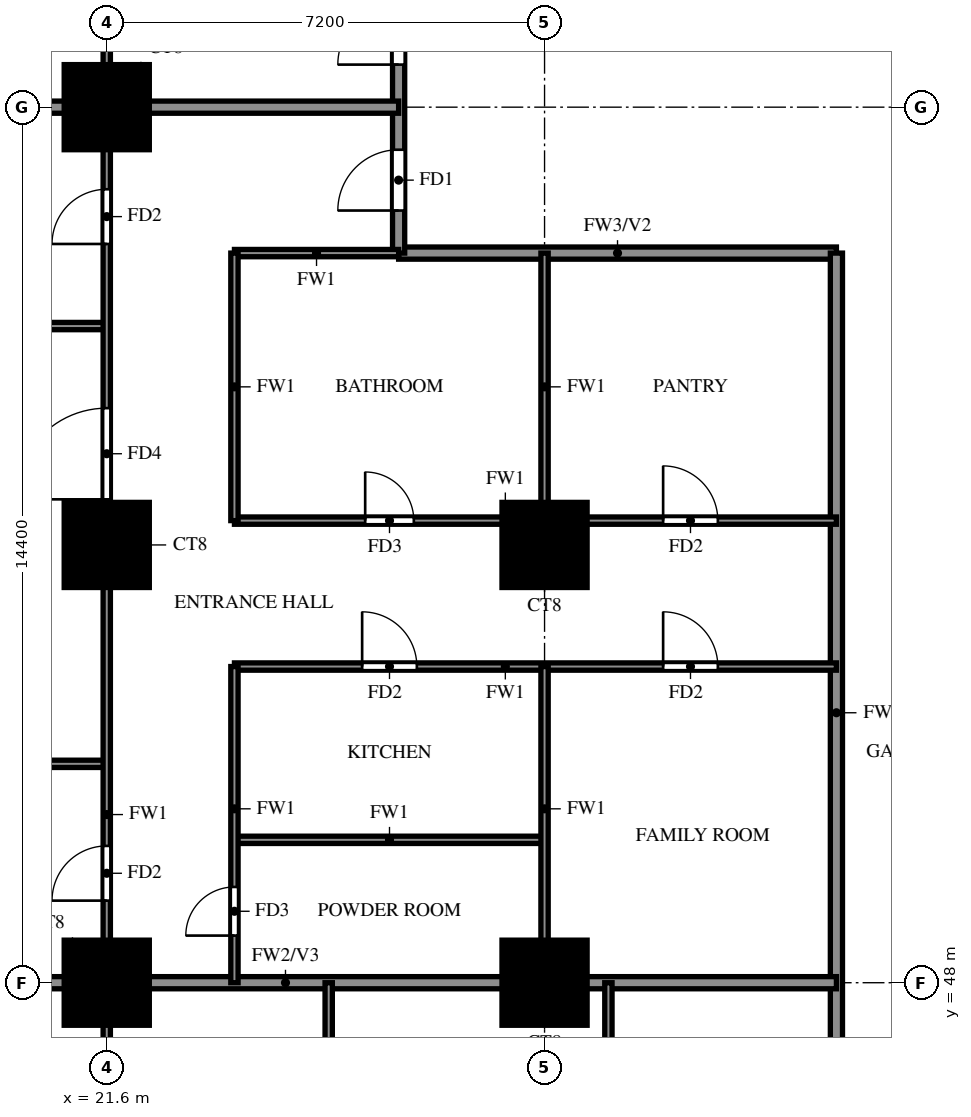
"""IFC4 building model, lengths in metres.
Left out: names, types, materials, properties, quantities, classifications, styles, units other than length and angle.
Written with IfcOpenShell. Run it as: python <this file> out.ifc"""

import sys

from ifc_helpers import new_model, si_unit, direction, frame, frame_2d, origin, origin_2d, place, context, subcontext, project, spatial, rectangle, extrude, source, transform, mapped, element, fill, save


model = new_model("IFC4")
c1 = context("Model", 3, precision=1e-05, world=origin(), true_north=direction((0.0, 1.0)))
c2 = subcontext(c1, "Body", "Model", "MODEL_VIEW")
j1 = project(units=[si_unit("LENGTHUNIT", "METRE"), si_unit("PLANEANGLEUNIT", "RADIAN")], contexts=[c1])
p1 = place(None, origin())
s1 = spatial("IfcSite", under=j1, at=p1, CompositionType="ELEMENT")
p2 = place(p1, origin())
s2 = spatial("IfcBuilding", under=s1, at=p2, CompositionType="ELEMENT")
p3 = place(p2, frame((0.0, 0.0, 34.0)))
s3 = spatial("IfcBuildingStorey", under=s2, at=p3, CompositionType="ELEMENT", Elevation=34.0)
m1 = source(origin(), c2, "Body", "SweptSolid", [
    extrude(rectangle(XDim=1.4, YDim=1.4, at=origin_2d()), origin(), (0.0, 0.0, 1.0), 3.18),
])
for number, where, z_axis, x_axis in (
    (1, (21.6, 48.0, 0.0), (0.0, 0.0, 1.0), (1.0, 0.0, 0.0)),
    (2, (28.8, 48.0, 0.0), (0.0, 0.0, 1.0), (1.0, 0.0, 0.0)),
    (3, (21.6, 55.2, 0.0), (0.0, 0.0, 1.0), (1.0, 0.0, 0.0)),
    (4, (28.8, 55.2, 0.0), (0.0, 0.0, 1.0), (1.0, 0.0, 0.0)),
    (5, (21.6, 62.4, 0.0), (0.0, 0.0, 1.0), (1.0, 0.0, 0.0)),
):
    element("IfcColumn", number, at=place(p3, frame(where, z_axis=z_axis, x_axis=x_axis)), inside=s3, PredefinedType="COLUMN", context=c2, shape_type="MappedRepresentation", body=[
        mapped(m1, transform((0.0, 0.0, 0.0))),
    ])
p4 = place(p3, frame((26.4, 60.0, 0.0), z_axis=(0.0, 0.0, 1.0), x_axis=(1.0, 0.0, 0.0)))
e6 = element("IfcWall", 6, at=p4, inside=s3, PredefinedType="SOLIDWALL", context=c2, shape_type="SweptSolid", body=[
    extrude(rectangle(XDim=7.2, YDim=0.2, at=frame_2d((3.6, 0.0))), origin(), (0.0, 0.0, 1.0), 3.18),
])
p5 = place(p3, frame((26.4, 60.0, 0.0), z_axis=(0.0, 0.0, 1.0), x_axis=(0.0, 1.0, 0.0)))
e7 = element("IfcWall", 7, at=p5, inside=s3, PredefinedType="SOLIDWALL", context=c2, shape_type="SweptSolid", body=[
    extrude(rectangle(XDim=9.6, YDim=0.2, at=frame_2d((4.8, 0.0))), origin(), (0.0, 0.0, 1.0), 3.18),
])
p6 = place(p5, frame((0.7, 0.0, 0.0)))
e8 = element("IfcOpeningElement", 8, at=p6, cuts=e7, PredefinedType="OPENING", context=c2, shape_type="SweptSolid", body=[
    extrude(rectangle(XDim=1.0, YDim=2.1, at=frame_2d((0.5, 1.05))), frame((0.0, 0.11, 0.0), z_axis=(0.0, -1.0, 0.0), x_axis=(1.0, 0.0, 0.0)), (0.0, 0.0, 1.0), 0.22),
])
p7 = place(p5, frame((3.1, 0.0, 0.0)))
e9 = element("IfcOpeningElement", 9, at=p7, cuts=e7, PredefinedType="OPENING", context=c2, shape_type="SweptSolid", body=[
    extrude(rectangle(XDim=1.0, YDim=2.1, at=frame_2d((0.5, 1.05))), frame((0.0, 0.11, 0.0), z_axis=(0.0, -1.0, 0.0), x_axis=(1.0, 0.0, 0.0)), (0.0, 0.0, 1.0), 0.22),
])
p8 = place(p3, frame((33.6, 45.6, 0.0), z_axis=(0.0, 0.0, 1.0), x_axis=(0.0, 1.0, 0.0)))
e10 = element("IfcWall", 10, at=p8, inside=s3, PredefinedType="SOLIDWALL", context=c2, shape_type="SweptSolid", body=[
    extrude(rectangle(XDim=14.4, YDim=0.2, at=frame_2d((7.2, 0.0))), origin(), (0.0, 0.0, 1.0), 3.18),
])
p9 = place(p3, frame((14.525, 48.0, 0.0), z_axis=(0.0, 0.0, 1.0), x_axis=(1.0, 0.0, 0.0)))
e11 = element("IfcWall", 11, at=p9, inside=s3, PredefinedType="SOLIDWALL", context=c2, shape_type="SweptSolid", body=[
    extrude(rectangle(XDim=19.075, YDim=0.2, at=frame_2d((9.538, 0.0))), origin(), (0.0, 0.0, 1.0), 3.18),
])
p10 = place(p3, frame((14.525, 62.4, 0.0), z_axis=(0.0, 0.0, 1.0), x_axis=(1.0, 0.0, 0.0)))
e12 = element("IfcWall", 12, at=p10, inside=s3, PredefinedType="SOLIDWALL", context=c2, shape_type="SweptSolid", body=[
    extrude(rectangle(XDim=11.875, YDim=0.2, at=frame_2d((5.938, 0.0))), origin(), (0.0, 0.0, 1.0), 3.18),
])
p11 = place(p3, frame((23.7, 50.35, 0.0), z_axis=(0.0, 0.0, 1.0), x_axis=(1.0, 0.0, 0.0)))
e13 = element("IfcWall", 13, at=p11, inside=s3, PredefinedType="PARTITIONING", context=c2, shape_type="SweptSolid", body=[
    extrude(rectangle(XDim=5.1, YDim=0.12, at=frame_2d((2.55, 0.0))), origin(), (0.0, 0.0, 1.0), 3.18),
])
p12 = place(p3, frame((14.525, 51.6, 0.0), z_axis=(0.0, 0.0, 1.0), x_axis=(1.0, 0.0, 0.0)))
e14 = element("IfcWall", 14, at=p12, inside=s3, PredefinedType="PARTITIONING", context=c2, shape_type="SweptSolid", body=[
    extrude(rectangle(XDim=7.075, YDim=0.12, at=frame_2d((3.538, 0.0))), origin(), (0.0, 0.0, 1.0), 2.28),
])
p13 = place(p3, frame((23.7, 53.2, 0.0), z_axis=(0.0, 0.0, 1.0), x_axis=(1.0, 0.0, 0.0)))
e15 = element("IfcWall", 15, at=p13, inside=s3, PredefinedType="PARTITIONING", context=c2, shape_type="SweptSolid", body=[
    extrude(rectangle(XDim=9.9, YDim=0.12, at=frame_2d((4.95, 0.0))), origin(), (0.0, 0.0, 1.0), 3.18),
])
p14 = place(p13, frame((2.1, 0.0, 0.0)))
e16 = element("IfcOpeningElement", 16, at=p14, cuts=e15, PredefinedType="OPENING", context=c2, shape_type="SweptSolid", body=[
    extrude(rectangle(XDim=0.9, YDim=2.1, at=frame_2d((0.45, 1.05))), frame((0.0, 0.07, 0.0), z_axis=(0.0, -1.0, 0.0), x_axis=(1.0, 0.0, 0.0)), (0.0, 0.0, 1.0), 0.14),
])
p15 = place(p13, frame((7.05, 0.0, 0.0)))
e17 = element("IfcOpeningElement", 17, at=p15, cuts=e15, PredefinedType="OPENING", context=c2, shape_type="SweptSolid", body=[
    extrude(rectangle(XDim=0.9, YDim=2.1, at=frame_2d((0.45, 1.05))), frame((0.0, 0.07, 0.0), z_axis=(0.0, -1.0, 0.0), x_axis=(1.0, 0.0, 0.0)), (0.0, 0.0, 1.0), 0.14),
])
p16 = place(p3, frame((23.7, 55.6, 0.0), z_axis=(0.0, 0.0, 1.0), x_axis=(1.0, 0.0, 0.0)))
e18 = element("IfcWall", 18, at=p16, inside=s3, PredefinedType="PARTITIONING", context=c2, shape_type="SweptSolid", body=[
    extrude(rectangle(XDim=9.9, YDim=0.12, at=frame_2d((4.95, 0.0))), origin(), (0.0, 0.0, 1.0), 3.18),
])
p17 = place(p16, frame((2.15, 0.0, 0.0)))
e19 = element("IfcOpeningElement", 19, at=p17, cuts=e18, PredefinedType="OPENING", context=c2, shape_type="SweptSolid", body=[
    extrude(rectangle(XDim=0.8, YDim=2.1, at=frame_2d((0.4, 1.05))), frame((0.0, 0.07, 0.0), z_axis=(0.0, -1.0, 0.0), x_axis=(1.0, 0.0, 0.0)), (0.0, 0.0, 1.0), 0.14),
])
p18 = place(p16, frame((7.05, 0.0, 0.0)))
e20 = element("IfcOpeningElement", 20, at=p18, cuts=e18, PredefinedType="OPENING", context=c2, shape_type="SweptSolid", body=[
    extrude(rectangle(XDim=0.9, YDim=2.1, at=frame_2d((0.45, 1.05))), frame((0.0, 0.07, 0.0), z_axis=(0.0, -1.0, 0.0), x_axis=(1.0, 0.0, 0.0)), (0.0, 0.0, 1.0), 0.14),
])
p19 = place(p3, frame((14.525, 58.8, 0.0), z_axis=(0.0, 0.0, 1.0), x_axis=(1.0, 0.0, 0.0)))
e21 = element("IfcWall", 21, at=p19, inside=s3, PredefinedType="PARTITIONING", context=c2, shape_type="SweptSolid", body=[
    extrude(rectangle(XDim=7.075, YDim=0.12, at=frame_2d((3.538, 0.0))), origin(), (0.0, 0.0, 1.0), 2.28),
])
p20 = place(p3, frame((23.7, 60.0, 0.0), z_axis=(0.0, 0.0, 1.0), x_axis=(1.0, 0.0, 0.0)))
e22 = element("IfcWall", 22, at=p20, inside=s3, PredefinedType="PARTITIONING", context=c2, shape_type="SweptSolid", body=[
    extrude(rectangle(XDim=2.7, YDim=0.12, at=frame_2d((1.35, 0.0))), origin(), (0.0, 0.0, 1.0), 3.18),
])
p21 = place(p3, frame((21.6, 33.725, 0.0), z_axis=(0.0, 0.0, 1.0), x_axis=(0.0, 1.0, 0.0)))
e23 = element("IfcWall", 23, at=p21, inside=s3, PredefinedType="PARTITIONING", context=c2, shape_type="SweptSolid", body=[
    extrude(rectangle(XDim=35.875, YDim=0.12, at=frame_2d((17.938, 0.0))), origin(), (0.0, 0.0, 1.0), 3.18),
])
p22 = place(p21, frame((7.775, 0.0, 0.0)))
e24 = element("IfcOpeningElement", 24, at=p22, cuts=e23, PredefinedType="OPENING", context=c2, shape_type="SweptSolid", body=[
    extrude(rectangle(XDim=0.9, YDim=2.1, at=frame_2d((0.45, 1.05))), frame((0.0, 0.07, 0.0), z_axis=(0.0, -1.0, 0.0), x_axis=(1.0, 0.0, 0.0)), (0.0, 0.0, 1.0), 0.14),
])
p23 = place(p21, frame((15.625, 0.0, 0.0)))
e25 = element("IfcOpeningElement", 25, at=p23, cuts=e23, PredefinedType="OPENING", context=c2, shape_type="SweptSolid", body=[
    extrude(rectangle(XDim=0.9, YDim=2.1, at=frame_2d((0.45, 1.05))), frame((0.0, 0.07, 0.0), z_axis=(0.0, -1.0, 0.0), x_axis=(1.0, 0.0, 0.0)), (0.0, 0.0, 1.0), 0.14),
])
p24 = place(p21, frame((22.225, 0.0, 0.0)))
e26 = element("IfcOpeningElement", 26, at=p24, cuts=e23, PredefinedType="OPENING", context=c2, shape_type="SweptSolid", body=[
    extrude(rectangle(XDim=1.5, YDim=2.1, at=frame_2d((0.75, 1.05))), frame((0.0, 0.07, 0.0), z_axis=(0.0, -1.0, 0.0), x_axis=(1.0, 0.0, 0.0)), (0.0, 0.0, 1.0), 0.14),
])
p25 = place(p21, frame((26.425, 0.0, 0.0)))
e27 = element("IfcOpeningElement", 27, at=p25, cuts=e23, PredefinedType="OPENING", context=c2, shape_type="SweptSolid", body=[
    extrude(rectangle(XDim=0.9, YDim=2.1, at=frame_2d((0.45, 1.05))), frame((0.0, 0.07, 0.0), z_axis=(0.0, -1.0, 0.0), x_axis=(1.0, 0.0, 0.0)), (0.0, 0.0, 1.0), 0.14),
])
p26 = place(p21, frame((30.025, 0.0, 0.0)))
e28 = element("IfcOpeningElement", 28, at=p26, cuts=e23, PredefinedType="OPENING", context=c2, shape_type="SweptSolid", body=[
    extrude(rectangle(XDim=0.9, YDim=2.1, at=frame_2d((0.45, 1.05))), frame((0.0, 0.07, 0.0), z_axis=(0.0, -1.0, 0.0), x_axis=(1.0, 0.0, 0.0)), (0.0, 0.0, 1.0), 0.14),
])
p27 = place(p21, frame((33.625, 0.0, 0.0)))
e29 = element("IfcOpeningElement", 29, at=p27, cuts=e23, PredefinedType="OPENING", context=c2, shape_type="SweptSolid", body=[
    extrude(rectangle(XDim=0.9, YDim=2.1, at=frame_2d((0.45, 1.05))), frame((0.0, 0.07, 0.0), z_axis=(0.0, -1.0, 0.0), x_axis=(1.0, 0.0, 0.0)), (0.0, 0.0, 1.0), 0.14),
])
p28 = place(p3, frame((23.7, 48.0, 0.0), z_axis=(0.0, 0.0, 1.0), x_axis=(0.0, 1.0, 0.0)))
e30 = element("IfcWall", 30, at=p28, inside=s3, PredefinedType="PARTITIONING", context=c2, shape_type="SweptSolid", body=[
    extrude(rectangle(XDim=5.2, YDim=0.12, at=frame_2d((2.6, 0.0))), origin(), (0.0, 0.0, 1.0), 3.18),
])
p29 = place(p28, frame((0.775, 0.0, 0.0)))
e31 = element("IfcOpeningElement", 31, at=p29, cuts=e30, PredefinedType="OPENING", context=c2, shape_type="SweptSolid", body=[
    extrude(rectangle(XDim=0.8, YDim=2.1, at=frame_2d((0.4, 1.05))), frame((0.0, 0.07, 0.0), z_axis=(0.0, -1.0, 0.0), x_axis=(1.0, 0.0, 0.0)), (0.0, 0.0, 1.0), 0.14),
])
p30 = place(p3, frame((23.7, 55.6, 0.0), z_axis=(0.0, 0.0, 1.0), x_axis=(0.0, 1.0, 0.0)))
e32 = element("IfcWall", 32, at=p30, inside=s3, PredefinedType="PARTITIONING", context=c2, shape_type="SweptSolid", body=[
    extrude(rectangle(XDim=4.4, YDim=0.12, at=frame_2d((2.2, 0.0))), origin(), (0.0, 0.0, 1.0), 3.18),
])
p31 = place(p3, frame((25.25, 42.9, 0.0), z_axis=(0.0, 0.0, 1.0), x_axis=(0.0, 1.0, 0.0)))
e33 = element("IfcWall", 33, at=p31, inside=s3, PredefinedType="PARTITIONING", context=c2, shape_type="SweptSolid", body=[
    extrude(rectangle(XDim=5.1, YDim=0.12, at=frame_2d((2.55, 0.0))), origin(), (0.0, 0.0, 1.0), 3.18),
])
p32 = place(p3, frame((28.8, 48.0, 0.0), z_axis=(0.0, 0.0, 1.0), x_axis=(0.0, 1.0, 0.0)))
e34 = element("IfcWall", 34, at=p32, inside=s3, PredefinedType="PARTITIONING", context=c2, shape_type="SweptSolid", body=[
    extrude(rectangle(XDim=5.2, YDim=0.12, at=frame_2d((2.6, 0.0))), origin(), (0.0, 0.0, 1.0), 3.18),
])
p33 = place(p3, frame((28.8, 55.6, 0.0), z_axis=(0.0, 0.0, 1.0), x_axis=(0.0, 1.0, 0.0)))
e35 = element("IfcWall", 35, at=p33, inside=s3, PredefinedType="PARTITIONING", context=c2, shape_type="SweptSolid", body=[
    extrude(rectangle(XDim=4.4, YDim=0.12, at=frame_2d((2.2, 0.0))), origin(), (0.0, 0.0, 1.0), 3.18),
])
p34 = place(p3, frame((29.85, 42.9, 0.0), z_axis=(0.0, 0.0, 1.0), x_axis=(0.0, 1.0, 0.0)))
e36 = element("IfcWall", 36, at=p34, inside=s3, PredefinedType="PARTITIONING", context=c2, shape_type="SweptSolid", body=[
    extrude(rectangle(XDim=5.1, YDim=0.12, at=frame_2d((2.55, 0.0))), origin(), (0.0, 0.0, 1.0), 3.18),
])
p35 = place(p6, origin())
e37 = element("IfcDoor", 37, at=p35, inside=s3, OperationType="SINGLE_SWING_RIGHT", PredefinedType="DOOR", context=c2, shape_type="SweptSolid", body=[
    extrude(rectangle(XDim=1.0, YDim=2.1, at=frame_2d((0.5, 1.05))), frame((0.0, 0.025, 0.0), z_axis=(0.0, -1.0, 0.0), x_axis=(1.0, 0.0, 0.0)), (0.0, 0.0, 1.0), 0.05),
])
fill(e8, e37)
p36 = place(p23, origin())
e38 = element("IfcDoor", 38, at=p36, inside=s3, OperationType="SINGLE_SWING_LEFT", PredefinedType="DOOR", context=c2, shape_type="SweptSolid", body=[
    extrude(rectangle(XDim=0.9, YDim=2.1, at=frame_2d((0.45, 1.05))), frame((0.0, 0.025, 0.0), z_axis=(0.0, -1.0, 0.0), x_axis=(1.0, 0.0, 0.0)), (0.0, 0.0, 1.0), 0.05),
])
fill(e25, e38)
p37 = place(p24, origin())
e39 = element("IfcDoor", 39, at=p37, inside=s3, OperationType="SINGLE_SWING_RIGHT", PredefinedType="DOOR", context=c2, shape_type="SweptSolid", body=[
    extrude(rectangle(XDim=1.5, YDim=2.1, at=frame_2d((0.75, 1.05))), frame((0.0, 0.025, 0.0), z_axis=(0.0, -1.0, 0.0), x_axis=(1.0, 0.0, 0.0)), (0.0, 0.0, 1.0), 0.05),
])
fill(e26, e39)
p38 = place(p25, origin())
e40 = element("IfcDoor", 40, at=p38, inside=s3, OperationType="SINGLE_SWING_RIGHT", PredefinedType="DOOR", context=c2, shape_type="SweptSolid", body=[
    extrude(rectangle(XDim=0.9, YDim=2.1, at=frame_2d((0.45, 1.05))), frame((0.0, 0.025, 0.0), z_axis=(0.0, -1.0, 0.0), x_axis=(1.0, 0.0, 0.0)), (0.0, 0.0, 1.0), 0.05),
])
fill(e27, e40)
p39 = place(p29, origin())
e41 = element("IfcDoor", 41, at=p39, inside=s3, OperationType="SINGLE_SWING_LEFT", PredefinedType="DOOR", context=c2, shape_type="SweptSolid", body=[
    extrude(rectangle(XDim=0.8, YDim=2.1, at=frame_2d((0.4, 1.05))), frame((0.0, 0.025, 0.0), z_axis=(0.0, -1.0, 0.0), x_axis=(1.0, 0.0, 0.0)), (0.0, 0.0, 1.0), 0.05),
])
fill(e31, e41)
p40 = place(p14, origin())
e42 = element("IfcDoor", 42, at=p40, inside=s3, OperationType="SINGLE_SWING_LEFT", PredefinedType="DOOR", context=c2, shape_type="SweptSolid", body=[
    extrude(rectangle(XDim=0.9, YDim=2.1, at=frame_2d((0.45, 1.05))), frame((0.0, 0.025, 0.0), z_axis=(0.0, -1.0, 0.0), x_axis=(1.0, 0.0, 0.0)), (0.0, 0.0, 1.0), 0.05),
])
fill(e16, e42)
p41 = place(p17, origin())
e43 = element("IfcDoor", 43, at=p41, inside=s3, OperationType="SINGLE_SWING_RIGHT", PredefinedType="DOOR", context=c2, shape_type="SweptSolid", body=[
    extrude(rectangle(XDim=0.8, YDim=2.1, at=frame_2d((0.4, 1.05))), frame((0.0, 0.025, 0.0), z_axis=(0.0, -1.0, 0.0), x_axis=(1.0, 0.0, 0.0)), (0.0, 0.0, 1.0), 0.05),
])
fill(e19, e43)
p42 = place(p15, origin())
e44 = element("IfcDoor", 44, at=p42, inside=s3, OperationType="SINGLE_SWING_LEFT", PredefinedType="DOOR", context=c2, shape_type="SweptSolid", body=[
    extrude(rectangle(XDim=0.9, YDim=2.1, at=frame_2d((0.45, 1.05))), frame((0.0, 0.025, 0.0), z_axis=(0.0, -1.0, 0.0), x_axis=(1.0, 0.0, 0.0)), (0.0, 0.0, 1.0), 0.05),
])
fill(e17, e44)
p43 = place(p18, origin())
e45 = element("IfcDoor", 45, at=p43, inside=s3, OperationType="SINGLE_SWING_LEFT", PredefinedType="DOOR", context=c2, shape_type="SweptSolid", body=[
    extrude(rectangle(XDim=0.9, YDim=2.1, at=frame_2d((0.45, 1.05))), frame((0.0, 0.025, 0.0), z_axis=(0.0, -1.0, 0.0), x_axis=(1.0, 0.0, 0.0)), (0.0, 0.0, 1.0), 0.05),
])
fill(e20, e45)
p44 = place(p7, origin())
e46 = element("IfcDoor", 46, at=p44, inside=s3, OperationType="SINGLE_SWING_LEFT", PredefinedType="DOOR", context=c2, shape_type="SweptSolid", body=[
    extrude(rectangle(XDim=1.0, YDim=2.1, at=frame_2d((0.5, 1.05))), frame((0.0, 0.025, 0.0), z_axis=(0.0, -1.0, 0.0), x_axis=(1.0, 0.0, 0.0)), (0.0, 0.0, 1.0), 0.05),
])
fill(e9, e46)
save(model, sys.argv[1])
